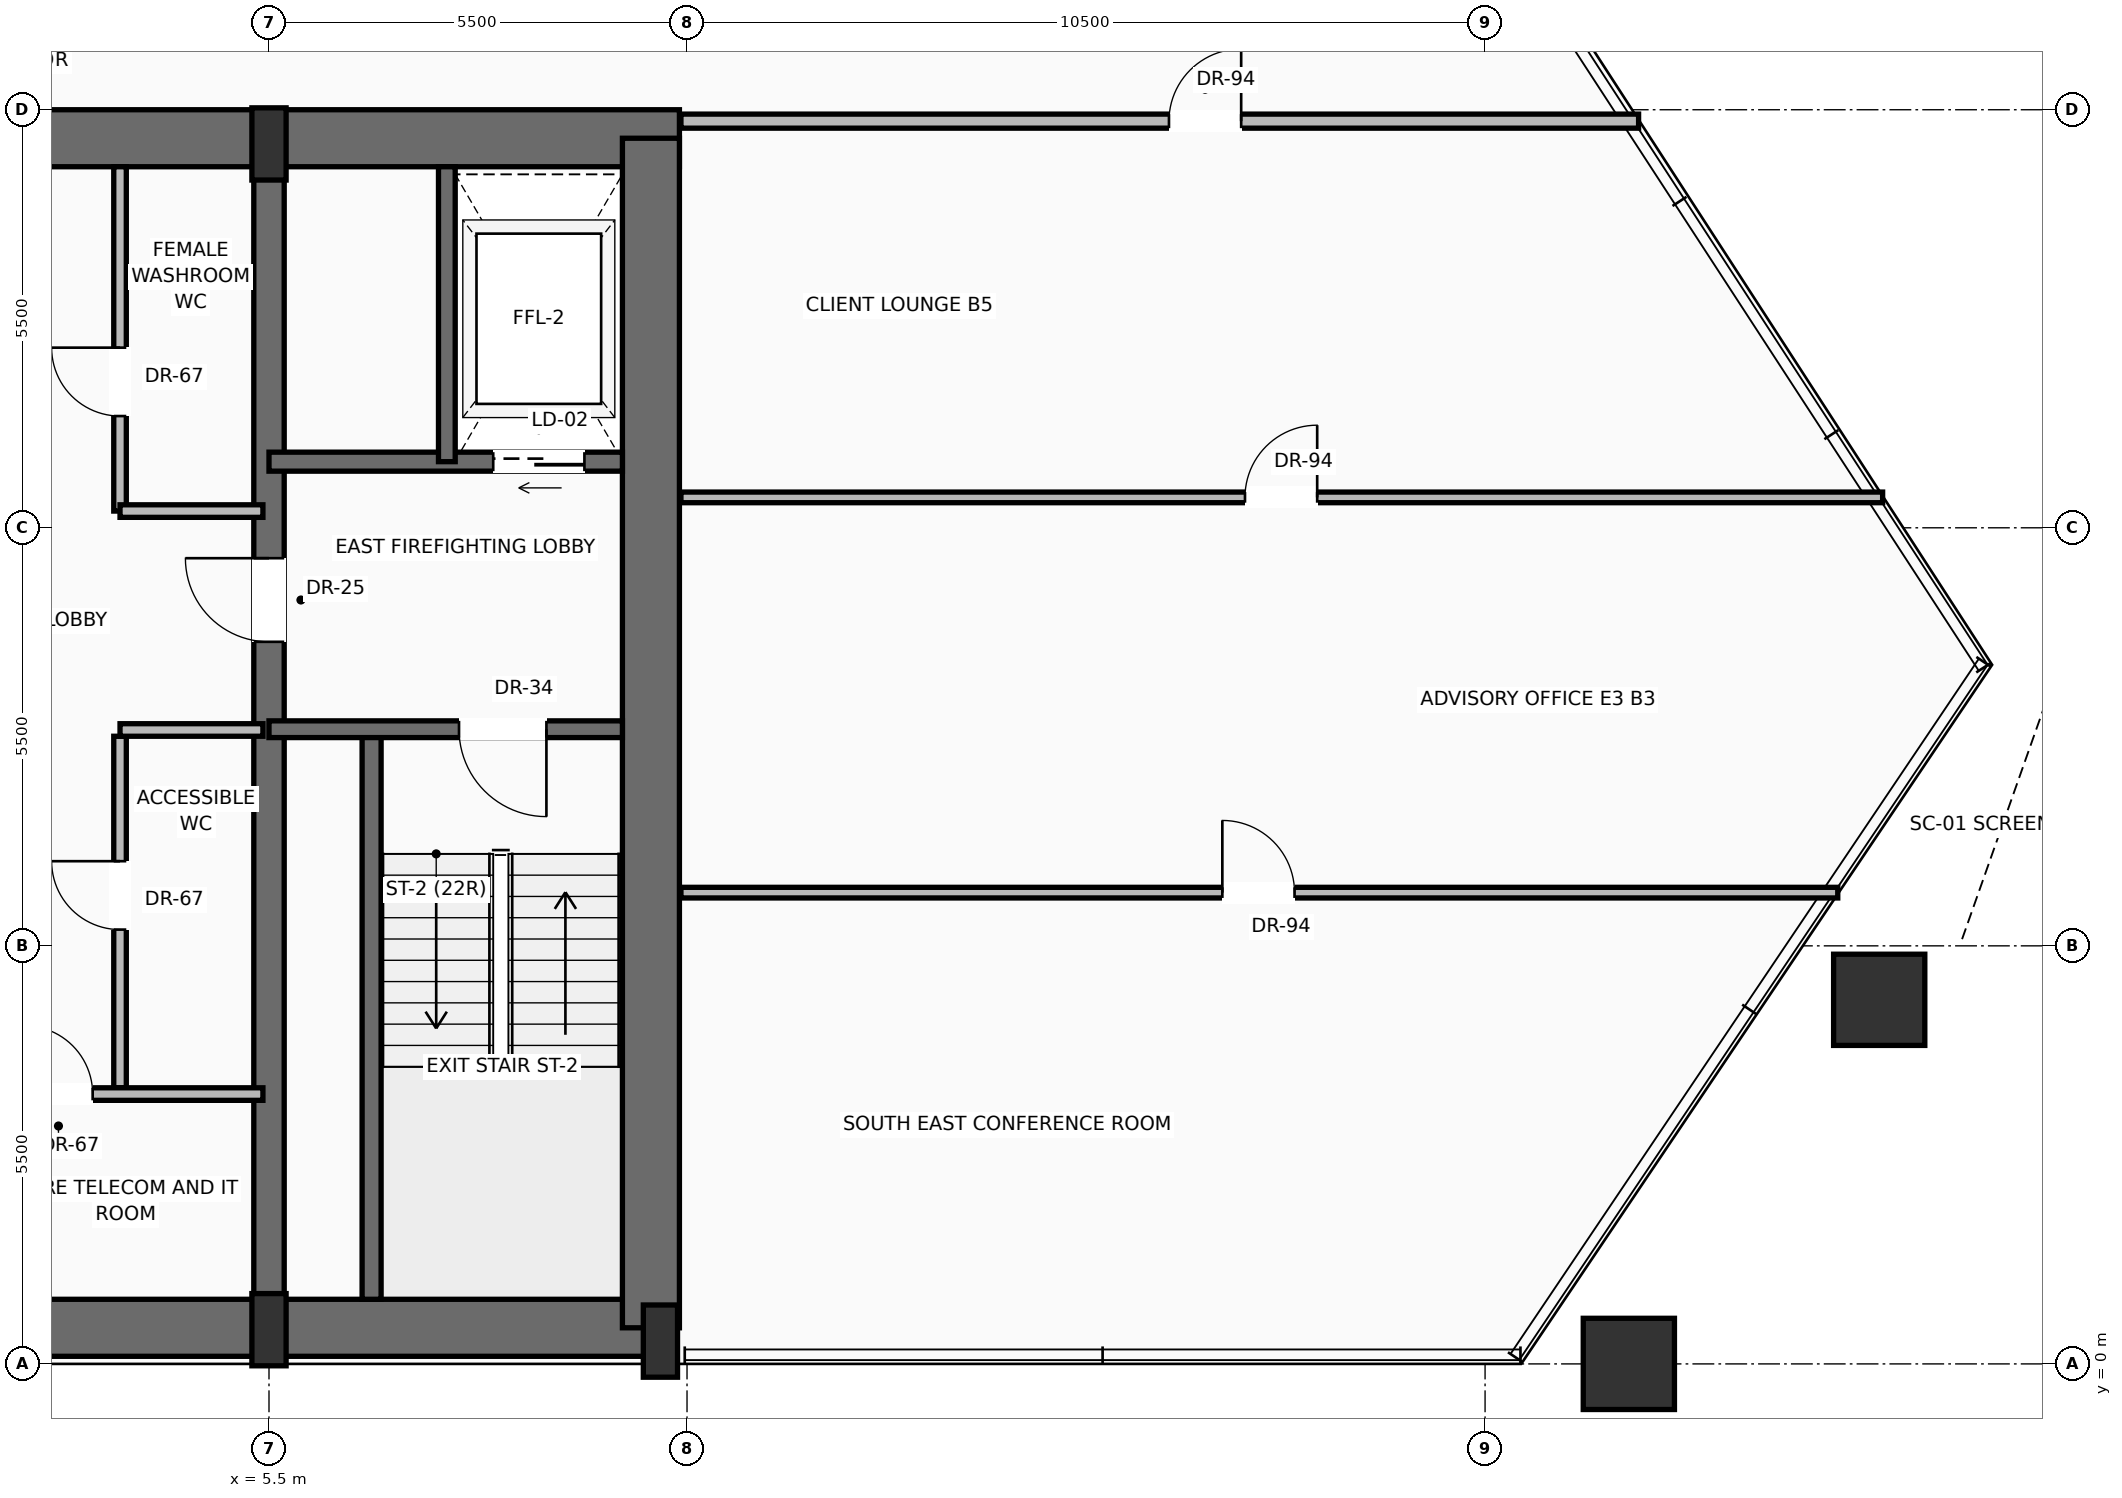
"""IFC4 building model, lengths in metres.
Left out: names, types, materials, properties, quantities, classifications, styles, units other than length and angle.
Written with IfcOpenShell. Run it as: python <this file> out.ifc"""

import sys

from ifc_helpers import new_model, si_unit, direction, frame, frame_2d, origin, origin_2d, place, context, subcontext, project, spatial, rectangle, hollow_rectangle, extrude, source, transform, mapped, element, fill, save


model = new_model("IFC4")
c1 = context("Model", 3, precision=1e-05, world=origin(), true_north=direction((0.0, 1.0)))
c2 = subcontext(c1, "Body", "Model", "MODEL_VIEW")
j1 = project(units=[si_unit("LENGTHUNIT", "METRE"), si_unit("PLANEANGLEUNIT", "RADIAN")], contexts=[c1])
p1 = place(None, origin())
s1 = spatial("IfcSite", under=j1, at=p1, CompositionType="ELEMENT")
p2 = place(p1, origin())
s2 = spatial("IfcBuilding", under=s1, at=p2, CompositionType="ELEMENT")
p3 = place(p2, frame((0.0, 0.0, 91.4)))
s3 = spatial("IfcBuildingStorey", under=s2, at=p3, CompositionType="ELEMENT", Elevation=91.4)
p4 = place(p3, frame((-10.65, 0.475, 0.0), z_axis=(0.0, 0.0, 1.0), x_axis=(1.0, 0.0, 0.0)))
e1 = element("IfcWall", 1, at=p4, inside=s3, PredefinedType="SHEAR", context=c2, shape_type="SweptSolid", body=[
    extrude(rectangle(XDim=21.3, YDim=0.75, at=frame_2d((10.65, 0.0))), origin(), (0.0, 0.0, 1.0), 3.45),
])
p5 = place(p3, frame((-10.9, 16.125, 0.0), z_axis=(0.0, 0.0, 1.0), x_axis=(1.0, 0.0, 0.0)))
e2 = element("IfcWall", 2, at=p5, inside=s3, PredefinedType="SHEAR", context=c2, shape_type="SweptSolid", body=[
    extrude(rectangle(XDim=21.8, YDim=0.75, at=frame_2d((10.9, 0.0))), origin(), (0.0, 0.0, 1.0), 3.45),
])
p6 = place(p5, frame((3.47, 0.0, 0.0)))
e3 = element("IfcOpeningElement", 3, at=p6, cuts=e2, PredefinedType="OPENING", context=c2, shape_type="SweptSolid", body=[
    extrude(rectangle(XDim=1.3, YDim=2.3, at=frame_2d((0.65, 1.15))), frame((0.0, 0.385, 0.0), z_axis=(0.0, -1.0, 0.0), x_axis=(1.0, 0.0, 0.0)), (0.0, 0.0, 1.0), 0.77),
])
p7 = place(p5, frame((9.9, 0.0, 0.0)))
e4 = element("IfcOpeningElement", 4, at=p7, cuts=e2, PredefinedType="OPENING", context=c2, shape_type="SweptSolid", body=[
    extrude(rectangle(XDim=2.0, YDim=2.4, at=frame_2d((1.0, 1.2))), frame((0.0, 0.385, 0.0), z_axis=(0.0, -1.0, 0.0), x_axis=(1.0, 0.0, 0.0)), (0.0, 0.0, 1.0), 0.77),
])
p8 = place(p3, frame((10.525, 0.475, 0.0), z_axis=(0.0, 0.0, 1.0), x_axis=(0.0, 1.0, 0.0)))
e5 = element("IfcWall", 5, at=p8, inside=s3, PredefinedType="SHEAR", context=c2, shape_type="SweptSolid", body=[
    extrude(rectangle(XDim=15.65, YDim=0.75, at=frame_2d((7.825, 0.0))), origin(), (0.0, 0.0, 1.0), 3.45),
])
p9 = place(p3, frame((5.5, 0.475, 0.0), z_axis=(0.0, 0.0, 1.0), x_axis=(0.0, 1.0, 0.0)))
e6 = element("IfcWall", 6, at=p9, inside=s3, PredefinedType="SHEAR", context=c2, shape_type="SweptSolid", body=[
    extrude(rectangle(XDim=15.65, YDim=0.4, at=frame_2d((7.825, 0.0))), origin(), (0.0, 0.0, 1.0), 3.45),
])
p10 = place(p9, frame((9.025, 0.0, 0.0)))
e7 = element("IfcOpeningElement", 7, at=p10, cuts=e6, PredefinedType="OPENING", context=c2, shape_type="SweptSolid", body=[
    extrude(rectangle(XDim=1.1, YDim=2.2, at=frame_2d((0.55, 1.1))), frame((0.0, 0.21, 0.0), z_axis=(0.0, -1.0, 0.0), x_axis=(1.0, 0.0, 0.0)), (0.0, 0.0, 1.0), 0.42),
])
m1 = source(origin(), c2, "Body", "SweptSolid", [
    extrude(rectangle(XDim=0.45, YDim=0.95, at=origin_2d()), origin(), (0.0, 0.0, 1.0), 3.7),
])
for number, where, z_axis, x_axis in (
    (8, (5.5, 0.45, 0.0), (0.0, 0.0, 1.0), (1.0, 0.0, 0.0)),
    (9, (10.65, 0.3, 0.0), (0.0, 0.0, 1.0), (1.0, 0.0, 0.0)),
    (10, (5.5, 16.05, 0.0), (0.0, 0.0, 1.0), (1.0, 0.0, 0.0)),
):
    element("IfcColumn", number, at=place(p3, frame(where, z_axis=z_axis, x_axis=x_axis)), inside=s3, PredefinedType="PILASTER", context=c2, shape_type="MappedRepresentation", body=[
        mapped(m1, transform((0.0, 0.0, 0.0), scale=1.0)),
    ])
m2 = source(origin(), c2, "Body", "SweptSolid", [
    extrude(hollow_rectangle(XDim=1.2, YDim=1.2, WallThickness=0.06, at=origin_2d()), origin(), (0.0, 0.0, 1.0), 3.692),
])
p11 = place(p3, frame((23.392, 0.0, 0.004), z_axis=(0.012366779089, 0.0, 0.999923528464), x_axis=(0.0, 1.0, 0.0)))
e11 = element("IfcColumn", 11, at=p11, inside=s3, PredefinedType="COLUMN", context=c2, shape_type="MappedRepresentation", body=[
    mapped(m2, transform((0.0, 0.0, 0.0), scale=1.0)),
])
m3 = source(origin(), c2, "Body", "SweptSolid", [
    extrude(hollow_rectangle(XDim=1.2, YDim=1.2, WallThickness=0.06, at=origin_2d()), origin(), (0.0, 0.0, 1.0), 3.692),
])
p12 = place(p3, frame((26.686, 4.79, 0.004), z_axis=(-0.000132258192, -0.016003241227, 0.999871931188), x_axis=(0.999965851077, -0.008264180587, 0.0)))
e12 = element("IfcColumn", 12, at=p12, inside=s3, PredefinedType="COLUMN", context=c2, shape_type="MappedRepresentation", body=[
    mapped(m3, transform((0.0, 0.0, 0.0), scale=1.0)),
])
p13 = place(p3, frame((6.85, 0.85, 0.0), z_axis=(0.0, 0.0, 1.0), x_axis=(0.0, 1.0, 0.0)))
e13 = element("IfcWall", 13, at=p13, inside=s3, PredefinedType="SOLIDWALL", context=c2, shape_type="SweptSolid", body=[
    extrude(rectangle(XDim=7.5, YDim=0.25, at=frame_2d((3.75, 0.0))), origin(), (0.0, 0.0, 1.0), 3.45),
])
p14 = place(p3, frame((10.15, 8.35, 0.0), z_axis=(0.0, 0.0, 1.0), x_axis=(-1.0, 0.0, 0.0)))
e14 = element("IfcWall", 14, at=p14, inside=s3, PredefinedType="SOLIDWALL", context=c2, shape_type="SweptSolid", body=[
    extrude(rectangle(XDim=4.65, YDim=0.22, at=frame_2d((2.325, 0.0))), origin(), (0.0, 0.0, 1.0), 3.45),
])
p15 = place(p14, frame((1.0, 0.0, 0.0)))
e15 = element("IfcOpeningElement", 15, at=p15, cuts=e14, PredefinedType="OPENING", context=c2, shape_type="SweptSolid", body=[
    extrude(rectangle(XDim=1.15, YDim=2.2, at=frame_2d((0.575, 1.1))), frame((0.0, 0.12, 0.0), z_axis=(0.0, -1.0, 0.0), x_axis=(1.0, 0.0, 0.0)), (0.0, 0.0, 1.0), 0.24),
])
p16 = place(p3, frame((10.15, 11.87, 0.0), z_axis=(0.0, 0.0, 1.0), x_axis=(-1.0, 0.0, 0.0)))
e16 = element("IfcWall", 16, at=p16, inside=s3, PredefinedType="SOLIDWALL", context=c2, shape_type="SweptSolid", body=[
    extrude(rectangle(XDim=4.65, YDim=0.25, at=frame_2d((2.325, 0.0))), origin(), (0.0, 0.0, 1.0), 3.45),
])
p17 = place(p16, frame((0.5, 0.0, 0.0)))
e17 = element("IfcOpeningElement", 17, at=p17, cuts=e16, PredefinedType="OPENING", context=c2, shape_type="SweptSolid", body=[
    extrude(rectangle(XDim=1.2, YDim=2.25, at=frame_2d((0.6, 1.125))), frame((0.0, 0.135, 0.0), z_axis=(0.0, -1.0, 0.0), x_axis=(1.0, 0.0, 0.0)), (0.0, 0.0, 1.0), 0.27),
])
p18 = place(p3, frame((7.84, 11.87, 0.0), z_axis=(0.0, 0.0, 1.0), x_axis=(0.0, 1.0, 0.0)))
e18 = element("IfcWall", 18, at=p18, inside=s3, PredefinedType="SOLIDWALL", context=c2, shape_type="SweptSolid", body=[
    extrude(rectangle(XDim=3.88, YDim=0.22, at=frame_2d((1.94, 0.0))), origin(), (0.0, 0.0, 1.0), 3.45),
])
p19 = place(p3, frame((3.54, 3.633, 0.0), z_axis=(0.0, 0.0, 1.0), x_axis=(0.0, 1.0, 0.0)))
e19 = element("IfcWall", 19, at=p19, inside=s3, PredefinedType="PARTITIONING", context=c2, shape_type="SweptSolid", body=[
    extrude(rectangle(XDim=4.625, YDim=0.165, at=frame_2d((2.312, 0.0))), origin(), (0.0, 0.0, 1.0), 3.442),
])
p20 = place(p19, frame((2.081, 0.0, 0.0)))
e20 = element("IfcOpeningElement", 20, at=p20, cuts=e19, PredefinedType="OPENING", context=c2, shape_type="SweptSolid", body=[
    extrude(rectangle(XDim=0.9, YDim=2.1, at=frame_2d((0.45, 1.05))), frame((0.0, 0.093, 0.0), z_axis=(0.0, -1.0, 0.0), x_axis=(1.0, 0.0, 0.0)), (0.0, 0.0, 1.0), 0.185),
])
p21 = place(p3, frame((3.54, 8.34, 0.0), z_axis=(0.0, 0.0, 1.0), x_axis=(1.0, 0.0, 0.0)))
e21 = element("IfcWall", 21, at=p21, inside=s3, PredefinedType="PARTITIONING", context=c2, shape_type="SweptSolid", body=[
    extrude(rectangle(XDim=1.88, YDim=0.165, at=frame_2d((0.94, 0.0))), origin(), (0.0, 0.0, 1.0), 3.442),
])
p22 = place(p3, frame((1.8, 3.55, 0.0), z_axis=(0.0, 0.0, 1.0), x_axis=(1.0, 0.0, 0.0)))
e22 = element("IfcWall", 22, at=p22, inside=s3, PredefinedType="PARTITIONING", context=c2, shape_type="SweptSolid", body=[
    extrude(rectangle(XDim=3.62, YDim=0.165, at=frame_2d((1.81, 0.0))), origin(), (0.0, 0.0, 1.0), 3.442),
])
p23 = place(p22, frame((0.48, 0.0, 0.0)))
e23 = element("IfcOpeningElement", 23, at=p23, cuts=e22, PredefinedType="OPENING", context=c2, shape_type="SweptSolid", body=[
    extrude(rectangle(XDim=0.9, YDim=2.1, at=frame_2d((0.45, 1.05))), frame((0.0, 0.093, 0.0), z_axis=(0.0, -1.0, 0.0), x_axis=(1.0, 0.0, 0.0)), (0.0, 0.0, 1.0), 0.185),
])
p24 = place(p3, frame((3.54, 11.22, 0.0), z_axis=(0.0, 0.0, 1.0), x_axis=(0.0, 1.0, 0.0)))
e24 = element("IfcWall", 24, at=p24, inside=s3, PredefinedType="PARTITIONING", context=c2, shape_type="SweptSolid", body=[
    extrude(rectangle(XDim=4.53, YDim=0.165, at=frame_2d((2.265, 0.0))), origin(), (0.0, 0.0, 1.0), 3.442),
])
p25 = place(p24, frame((1.25, 0.0, 0.0)))
e25 = element("IfcOpeningElement", 25, at=p25, cuts=e24, PredefinedType="OPENING", context=c2, shape_type="SweptSolid", body=[
    extrude(rectangle(XDim=0.9, YDim=2.1, at=frame_2d((0.45, 1.05))), frame((0.0, 0.093, 0.0), z_axis=(0.0, -1.0, 0.0), x_axis=(1.0, 0.0, 0.0)), (0.0, 0.0, 1.0), 0.185),
])
p26 = place(p3, frame((3.54, 11.22, 0.0), z_axis=(0.0, 0.0, 1.0), x_axis=(1.0, 0.0, 0.0)))
e26 = element("IfcWall", 26, at=p26, inside=s3, PredefinedType="PARTITIONING", context=c2, shape_type="SweptSolid", body=[
    extrude(rectangle(XDim=1.88, YDim=0.165, at=frame_2d((0.94, 0.0))), origin(), (0.0, 0.0, 1.0), 3.442),
])
p27 = place(p3, frame((10.92, 16.35, 0.0), z_axis=(0.0, 0.0, 1.0), x_axis=(1.0, 0.0, 0.0)))
e27 = element("IfcWall", 27, at=p27, inside=s3, PredefinedType="PARTITIONING", context=c2, shape_type="SweptSolid", body=[
    extrude(rectangle(XDim=12.6, YDim=0.185, at=frame_2d((6.3, 0.0))), origin(), (0.0, 0.0, 1.0), 2.747),
])
p28 = place(p27, frame((6.421, 0.0, 0.0)))
e28 = element("IfcOpeningElement", 28, at=p28, cuts=e27, PredefinedType="OPENING", context=c2, shape_type="SweptSolid", body=[
    extrude(rectangle(XDim=0.95, YDim=2.2, at=frame_2d((0.475, 1.1))), frame((0.0, 0.103, 0.0), z_axis=(0.0, -1.0, 0.0), x_axis=(1.0, 0.0, 0.0)), (0.0, 0.0, 1.0), 0.205),
])
p29 = place(p3, frame((10.92, 6.2, 0.0), z_axis=(0.0, 0.0, 1.0), x_axis=(1.0, 0.0, 0.0)))
e29 = element("IfcWall", 29, at=p29, inside=s3, PredefinedType="PARTITIONING", context=c2, shape_type="SweptSolid", body=[
    extrude(rectangle(XDim=15.22, YDim=0.14, at=frame_2d((7.61, 0.0))), origin(), (0.0, 0.0, 1.0), 2.979),
])
p30 = place(p29, frame((7.123, 0.0, 0.0)))
e30 = element("IfcOpeningElement", 30, at=p30, cuts=e29, PredefinedType="OPENING", context=c2, shape_type="SweptSolid", body=[
    extrude(rectangle(XDim=0.95, YDim=2.2, at=frame_2d((0.475, 1.1))), frame((0.0, 0.08, 0.0), z_axis=(0.0, -1.0, 0.0), x_axis=(1.0, 0.0, 0.0)), (0.0, 0.0, 1.0), 0.16),
])
p31 = place(p3, frame((10.92, 11.4, 0.0), z_axis=(0.0, 0.0, 1.0), x_axis=(1.0, 0.0, 0.0)))
e31 = element("IfcWall", 31, at=p31, inside=s3, PredefinedType="PARTITIONING", context=c2, shape_type="SweptSolid", body=[
    extrude(rectangle(XDim=15.811, YDim=0.14, at=frame_2d((7.905, 0.0))), origin(), (0.0, 0.0, 1.0), 3.442),
])
p32 = place(p31, frame((7.421, 0.0, 0.0)))
e32 = element("IfcOpeningElement", 32, at=p32, cuts=e31, PredefinedType="OPENING", context=c2, shape_type="SweptSolid", body=[
    extrude(rectangle(XDim=0.95, YDim=2.2, at=frame_2d((0.475, 1.1))), frame((0.0, 0.08, 0.0), z_axis=(0.0, -1.0, 0.0), x_axis=(1.0, 0.0, 0.0)), (0.0, 0.0, 1.0), 0.16),
])
m4 = source(origin(), c2, "Body", "SweptSolid", [
    extrude(rectangle(XDim=1.15, YDim=2.2, at=frame_2d((0.575, 1.1))), frame((0.0, 0.025, 0.0), z_axis=(0.0, -1.0, 0.0), x_axis=(1.0, 0.0, 0.0)), (0.0, 0.0, 1.0), 0.05),
])
p33 = place(p15, origin())
e33 = element("IfcDoor", 33, at=p33, inside=s3, OperationType="SINGLE_SWING_LEFT", PredefinedType="DOOR", context=c2, shape_type="MappedRepresentation", body=[
    mapped(m4, transform((0.0, 0.0, 0.0), scale=1.0)),
])
fill(e15, e33)
m5 = source(origin(), c2, "Body", "SweptSolid", [
    extrude(rectangle(XDim=1.1, YDim=2.2, at=frame_2d((0.55, 1.1))), frame((0.0, 0.025, 0.0), z_axis=(0.0, -1.0, 0.0), x_axis=(1.0, 0.0, 0.0)), (0.0, 0.0, 1.0), 0.05),
])
p34 = place(p10, origin())
e34 = element("IfcDoor", 34, at=p34, inside=s3, OperationType="SINGLE_SWING_RIGHT", PredefinedType="DOOR", context=c2, shape_type="MappedRepresentation", body=[
    mapped(m5, transform((0.0, 0.0, 0.0), scale=1.0)),
])
fill(e7, e34)
m6 = source(origin(), c2, "Body", "SweptSolid", [
    extrude(rectangle(XDim=1.2, YDim=2.25, at=frame_2d((0.6, 1.125))), frame((0.0, 0.025, 0.0), z_axis=(0.0, -1.0, 0.0), x_axis=(1.0, 0.0, 0.0)), (0.0, 0.0, 1.0), 0.05),
])
p35 = place(p17, origin())
e35 = element("IfcDoor", 35, at=p35, inside=s3, OperationType="SLIDING_TO_RIGHT", PredefinedType="DOOR", context=c2, shape_type="MappedRepresentation", body=[
    mapped(m6, transform((0.0, 0.0, 0.0), scale=1.0)),
])
fill(e17, e35)
m7 = source(origin(), c2, "Body", "SweptSolid", [
    extrude(rectangle(XDim=0.9, YDim=2.1, at=frame_2d((0.45, 1.05))), frame((0.0, 0.025, 0.0), z_axis=(0.0, -1.0, 0.0), x_axis=(1.0, 0.0, 0.0)), (0.0, 0.0, 1.0), 0.05),
])
p36 = place(p23, origin())
e36 = element("IfcDoor", 36, at=p36, inside=s3, OperationType="SINGLE_SWING_LEFT", PredefinedType="DOOR", context=c2, shape_type="MappedRepresentation", body=[
    mapped(m7, transform((0.0, 0.0, 0.0), scale=1.0)),
])
fill(e23, e36)
p37 = place(p20, origin())
e37 = element("IfcDoor", 37, at=p37, inside=s3, OperationType="SINGLE_SWING_RIGHT", PredefinedType="DOOR", context=c2, shape_type="MappedRepresentation", body=[
    mapped(m7, transform((0.0, 0.0, 0.0), scale=1.0)),
])
fill(e20, e37)
p38 = place(p25, origin())
e38 = element("IfcDoor", 38, at=p38, inside=s3, OperationType="SINGLE_SWING_RIGHT", PredefinedType="DOOR", context=c2, shape_type="MappedRepresentation", body=[
    mapped(m7, transform((0.0, 0.0, 0.0), scale=1.0)),
])
fill(e25, e38)
m8 = source(origin(), c2, "Body", "SweptSolid", [
    extrude(rectangle(XDim=0.95, YDim=2.2, at=frame_2d((0.475, 1.1))), frame((0.0, 0.025, 0.0), z_axis=(0.0, -1.0, 0.0), x_axis=(1.0, 0.0, 0.0)), (0.0, 0.0, 1.0), 0.05),
])
p39 = place(p28, origin())
e39 = element("IfcDoor", 39, at=p39, inside=s3, OperationType="SINGLE_SWING_RIGHT", PredefinedType="DOOR", context=c2, shape_type="MappedRepresentation", body=[
    mapped(m8, transform((0.0, 0.0, 0.0), scale=1.0)),
])
fill(e28, e39)
p40 = place(p32, origin())
e40 = element("IfcDoor", 40, at=p40, inside=s3, OperationType="SINGLE_SWING_RIGHT", PredefinedType="DOOR", context=c2, shape_type="MappedRepresentation", body=[
    mapped(m8, transform((0.0, 0.0, 0.0), scale=1.0)),
])
fill(e32, e40)
p41 = place(p30, origin())
e41 = element("IfcDoor", 41, at=p41, inside=s3, OperationType="SINGLE_SWING_LEFT", PredefinedType="DOOR", context=c2, shape_type="MappedRepresentation", body=[
    mapped(m8, transform((0.0, 0.0, 0.0), scale=1.0)),
])
fill(e30, e41)
save(model, sys.argv[1])
